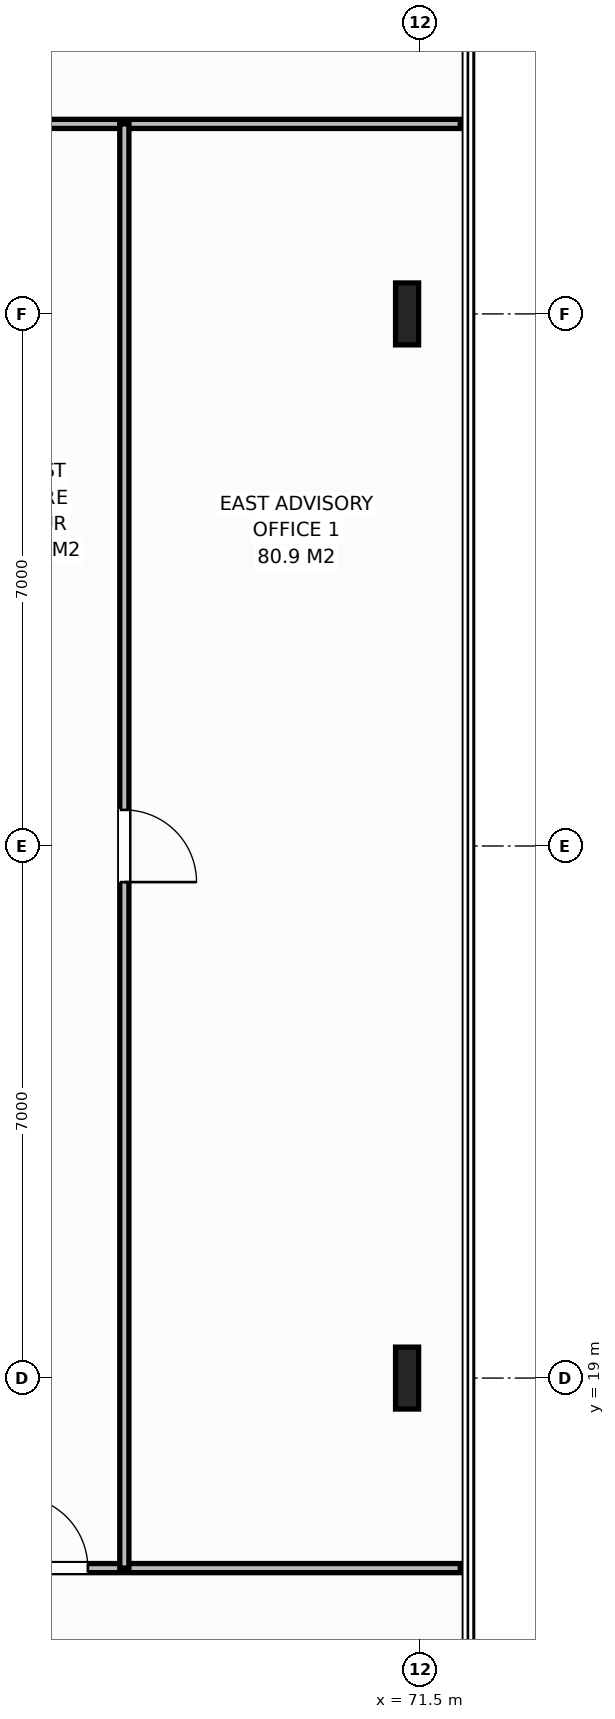
"""IFC4 building model, lengths in metres.
Left out: names, types, materials, properties, quantities, classifications, styles, units other than length and angle.
Written with IfcOpenShell. Run it as: python <this file> out.ifc"""

import sys

from ifc_helpers import new_model, si_unit, direction, frame, frame_2d, origin, origin_2d, place, context, subcontext, project, spatial, rectangle, i_section, extrude, element, fill, save


model = new_model("IFC4")
c1 = context("Model", 3, precision=1e-05, world=origin(), true_north=direction((0.0, 1.0)))
c2 = subcontext(c1, "Body", "Model", "MODEL_VIEW")
j1 = project(units=[si_unit("LENGTHUNIT", "METRE"), si_unit("PLANEANGLEUNIT", "RADIAN")], contexts=[c1])
p1 = place(None, origin())
s1 = spatial("IfcSite", under=j1, at=p1, CompositionType="ELEMENT")
p2 = place(p1, origin())
s2 = spatial("IfcBuilding", under=s1, at=p2, CompositionType="ELEMENT")
p3 = place(p2, frame((0.0, 0.0, 213.8)))
s3 = spatial("IfcBuildingStorey", under=s2, at=p3, CompositionType="ELEMENT", Elevation=213.8)
for number, where, z_axis, x_axis in (
    (1, (71.32, 19.0, 0.0), (0.0, 0.0, 1.0), (1.0, 0.0, 0.0)),
    (2, (71.32, 33.0, 0.0), (0.0, 0.0, 1.0), (1.0, 0.0, 0.0)),
):
    element("IfcColumn", number, at=place(p3, frame(where, z_axis=z_axis, x_axis=x_axis)), inside=s3, PredefinedType="COLUMN", context=c2, shape_type="SweptSolid", body=[
        extrude(i_section(OverallWidth=0.303, OverallDepth=0.814, WebThickness=0.021, FlangeThickness=0.04, at=origin_2d()), origin(), (0.0, 0.0, 1.0), 3.8),
    ])
p4 = place(p3, frame((59.691, 35.5, 0.0), z_axis=(0.0, 0.0, 1.0), x_axis=(1.0, 0.0, 0.0)))
e3 = element("IfcWall", 3, at=p4, inside=s3, PredefinedType="PARTITIONING", context=c2, shape_type="SweptSolid", body=[
    extrude(rectangle(XDim=12.329, YDim=0.12, at=frame_2d((6.165, 0.0))), origin(), (0.0, 0.0, 1.0), 3.58),
])
p5 = place(p4, frame((0.48, 0.0, 0.0)))
e4 = element("IfcOpeningElement", 4, at=p5, cuts=e3, PredefinedType="OPENING", context=c2, shape_type="SweptSolid", body=[
    extrude(rectangle(XDim=0.95, YDim=2.15, at=frame_2d((0.475, 1.075))), frame((0.0, 0.07, 0.0), z_axis=(0.0, -1.0, 0.0), x_axis=(1.0, 0.0, 0.0)), (0.0, 0.0, 1.0), 0.14),
])
p6 = place(p3, frame((64.86, 16.5, 0.0), z_axis=(0.0, 0.0, 1.0), x_axis=(1.0, 0.0, 0.0)))
e5 = element("IfcWall", 5, at=p6, inside=s3, PredefinedType="PARTITIONING", context=c2, shape_type="SweptSolid", body=[
    extrude(rectangle(XDim=7.16, YDim=0.12, at=frame_2d((3.58, 0.0))), origin(), (0.0, 0.0, 1.0), 3.58),
])
p7 = place(p6, frame((1.31, 0.0, 0.0)))
e6 = element("IfcOpeningElement", 6, at=p7, cuts=e5, PredefinedType="OPENING", context=c2, shape_type="SweptSolid", body=[
    extrude(rectangle(XDim=0.95, YDim=2.15, at=frame_2d((0.475, 1.075))), frame((0.0, 0.07, 0.0), z_axis=(0.0, -1.0, 0.0), x_axis=(1.0, 0.0, 0.0)), (0.0, 0.0, 1.0), 0.14),
])
p8 = place(p3, frame((67.6, 16.5, 0.0), z_axis=(0.0, 0.0, 1.0), x_axis=(0.0, 1.0, 0.0)))
e7 = element("IfcWall", 7, at=p8, inside=s3, PredefinedType="PARTITIONING", context=c2, shape_type="SweptSolid", body=[
    extrude(rectangle(XDim=19.0, YDim=0.12, at=frame_2d((9.5, 0.0))), origin(), (0.0, 0.0, 1.0), 3.58),
])
p9 = place(p8, frame((9.025, 0.0, 0.0)))
e8 = element("IfcOpeningElement", 8, at=p9, cuts=e7, PredefinedType="OPENING", context=c2, shape_type="SweptSolid", body=[
    extrude(rectangle(XDim=0.95, YDim=2.15, at=frame_2d((0.475, 1.075))), frame((0.0, 0.07, 0.0), z_axis=(0.0, -1.0, 0.0), x_axis=(1.0, 0.0, 0.0)), (0.0, 0.0, 1.0), 0.14),
])
p10 = place(p7, origin())
e9 = element("IfcDoor", 9, at=p10, inside=s3, OperationType="SINGLE_SWING_LEFT", PredefinedType="DOOR", context=c2, shape_type="SweptSolid", body=[
    extrude(rectangle(XDim=0.95, YDim=2.15, at=frame_2d((0.475, 1.075))), frame((0.0, 0.025, 0.0), z_axis=(0.0, -1.0, 0.0), x_axis=(1.0, 0.0, 0.0)), (0.0, 0.0, 1.0), 0.05),
])
fill(e6, e9)
p11 = place(p9, origin())
e10 = element("IfcDoor", 10, at=p11, inside=s3, OperationType="SINGLE_SWING_RIGHT", PredefinedType="DOOR", context=c2, shape_type="SweptSolid", body=[
    extrude(rectangle(XDim=0.95, YDim=2.15, at=frame_2d((0.475, 1.075))), frame((0.0, 0.025, 0.0), z_axis=(0.0, -1.0, 0.0), x_axis=(1.0, 0.0, 0.0)), (0.0, 0.0, 1.0), 0.05),
])
fill(e8, e10)
save(model, sys.argv[1])
